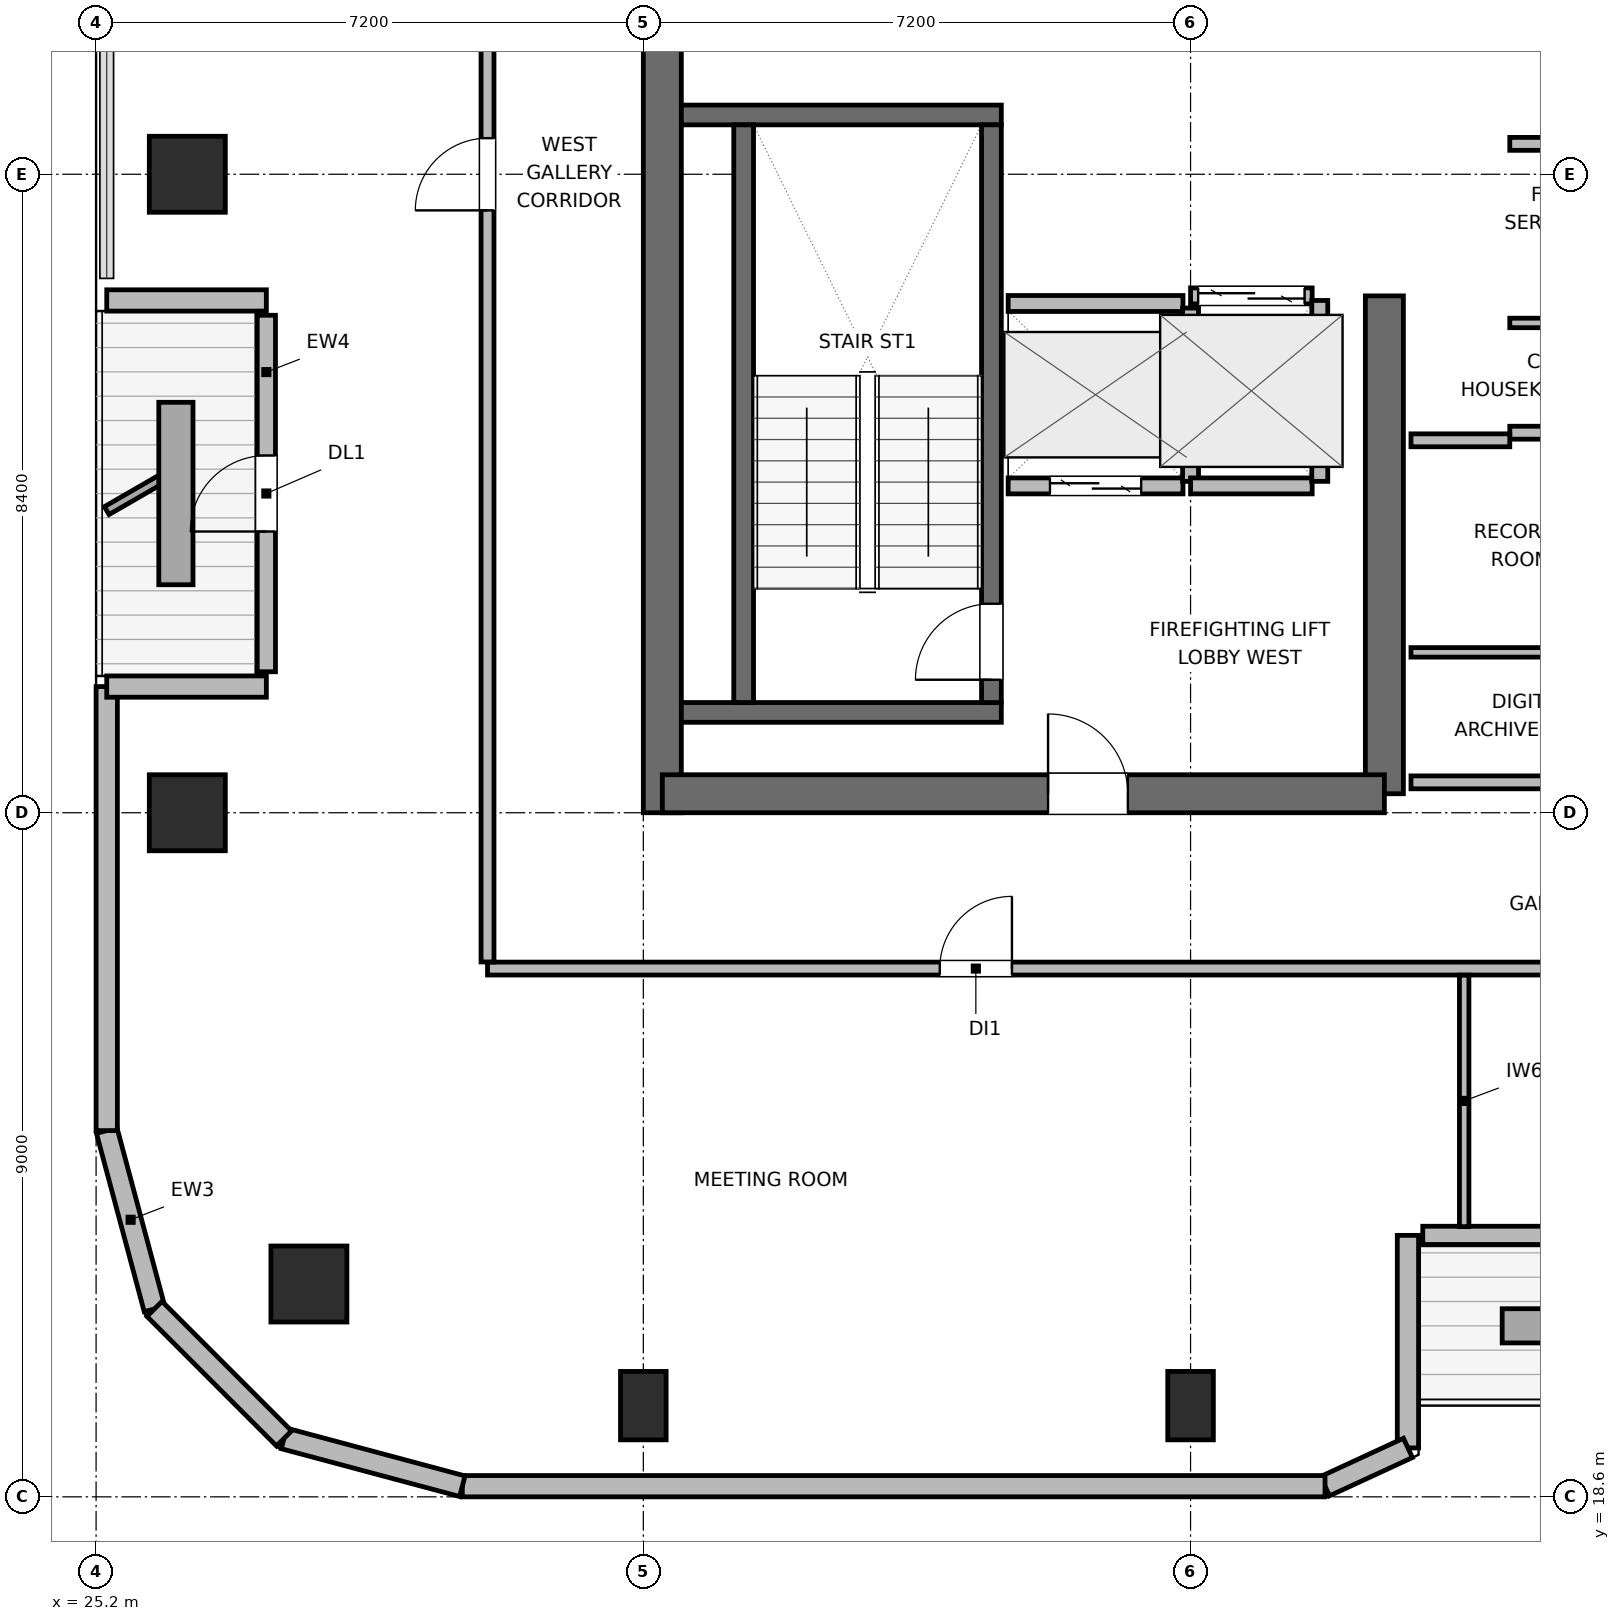
"""IFC4 building model, lengths in metres.
Left out: names, types, materials, properties, quantities, classifications, styles, units other than length and angle.
Written with IfcOpenShell. Run it as: python <this file> out.ifc"""

import sys

from ifc_helpers import new_model, si_unit, direction, frame, frame_2d, origin, origin_2d, place, context, subcontext, project, spatial, rectangle, circle, extrude, element, fill, save


model = new_model("IFC4")
c1 = context("Model", 3, precision=1e-05, world=origin(), true_north=direction((0.0, 1.0)))
c2 = subcontext(c1, "Body", "Model", "MODEL_VIEW")
j1 = project(units=[si_unit("LENGTHUNIT", "METRE"), si_unit("PLANEANGLEUNIT", "RADIAN")], contexts=[c1])
p1 = place(None, origin())
s1 = spatial("IfcSite", under=j1, at=p1, CompositionType="ELEMENT")
p2 = place(p1, origin())
s2 = spatial("IfcBuilding", under=s1, at=p2, CompositionType="ELEMENT")
p3 = place(p2, frame((0.0, 0.0, 274.5)))
s3 = spatial("IfcBuildingStorey", under=s2, at=p3, CompositionType="ELEMENT", Elevation=274.5)
p4 = place(p3, frame((32.65, 27.6, 0.0), z_axis=(0.0, 0.0, 1.0), x_axis=(0.0, 1.0, 0.0)))
e1 = element("IfcWall", 1, at=p4, inside=s3, PredefinedType="SHEAR", context=c2, shape_type="SweptSolid", body=[
    extrude(rectangle(XDim=16.8, YDim=0.5, at=frame_2d((8.4, 0.0))), origin(), (0.0, 0.0, 1.0), 3.9),
])
p5 = place(p3, frame((42.15, 27.85, 0.0), z_axis=(0.0, 0.0, 1.0), x_axis=(0.0, 1.0, 0.0)))
e2 = element("IfcWall", 2, at=p5, inside=s3, PredefinedType="SHEAR", context=c2, shape_type="SweptSolid", body=[
    extrude(rectangle(XDim=6.55, YDim=0.5, at=frame_2d((3.275, 0.0))), origin(), (0.0, 0.0, 1.0), 3.9),
])
p6 = place(p3, frame((32.65, 27.85, 0.0), z_axis=(0.0, 0.0, 1.0), x_axis=(1.0, 0.0, 0.0)))
e3 = element("IfcWall", 3, at=p6, inside=s3, PredefinedType="SHEAR", context=c2, shape_type="SweptSolid", body=[
    extrude(rectangle(XDim=9.5, YDim=0.5, at=frame_2d((4.75, 0.0))), origin(), (0.0, 0.0, 1.0), 3.9),
])
p7 = place(p6, frame((5.075, 0.0, 0.0)))
e4 = element("IfcOpeningElement", 4, at=p7, cuts=e3, PredefinedType="OPENING", context=c2, shape_type="SweptSolid", body=[
    extrude(rectangle(XDim=1.05, YDim=2.04, at=frame_2d((0.525, 1.02))), frame((0.0, 0.26, 0.0), z_axis=(0.0, -1.0, 0.0), x_axis=(1.0, 0.0, 0.0)), (0.0, 0.0, 1.0), 0.52),
])
for number, where, z_axis, x_axis in (
    (5, (32.9, 28.92, 0.0), (0.0, 0.0, 1.0), (1.0, 0.0, 0.0)),
    (6, (32.9, 36.78, 0.0), (0.0, 0.0, 1.0), (1.0, 0.0, 0.0)),
):
    element("IfcWall", number, at=place(p3, frame(where, z_axis=z_axis, x_axis=x_axis)), inside=s3, PredefinedType="SHEAR", context=c2, shape_type="SweptSolid", body=[
        extrude(rectangle(XDim=4.21, YDim=0.26, at=frame_2d((2.105, 0.0))), origin(), (0.0, 0.0, 1.0), 3.9),
    ])
p8 = place(p3, frame((33.72, 29.05, 0.0), z_axis=(0.0, 0.0, 1.0), x_axis=(0.0, 1.0, 0.0)))
e7 = element("IfcWall", 7, at=p8, inside=s3, PredefinedType="SHEAR", context=c2, shape_type="SweptSolid", body=[
    extrude(rectangle(XDim=7.6, YDim=0.26, at=frame_2d((3.8, 0.0))), origin(), (0.0, 0.0, 1.0), 3.9),
])
p9 = place(p3, frame((36.98, 29.05, 0.0), z_axis=(0.0, 0.0, 1.0), x_axis=(0.0, 1.0, 0.0)))
e8 = element("IfcWall", 8, at=p9, inside=s3, PredefinedType="SHEAR", context=c2, shape_type="SweptSolid", body=[
    extrude(rectangle(XDim=7.6, YDim=0.26, at=frame_2d((3.8, 0.0))), origin(), (0.0, 0.0, 1.0), 3.9),
])
p10 = place(p9, frame((0.3, 0.0, 0.0)))
e9 = element("IfcOpeningElement", 9, at=p10, cuts=e8, PredefinedType="OPENING", context=c2, shape_type="SweptSolid", body=[
    extrude(rectangle(XDim=1.0, YDim=2.04, at=frame_2d((0.5, 1.02))), frame((0.0, 0.14, 0.0), z_axis=(0.0, -1.0, 0.0), x_axis=(1.0, 0.0, 0.0)), (0.0, 0.0, 1.0), 0.28),
])
p11 = place(p3, frame((28.0, 21.4, 0.0), z_axis=(0.0, 0.0, 1.0), x_axis=(1.0, 0.0, 0.0)))
e10 = element("IfcColumn", 10, at=p11, inside=s3, PredefinedType="COLUMN", context=c2, shape_type="SweptSolid", body=[
    extrude(circle(Radius=0.5, at=origin_2d()), origin(), (0.0, 0.0, 1.0), 3.9),
])
for number, where, z_axis, x_axis in (
    (11, (32.4, 19.8, 0.0), (0.0, 0.0, 1.0), (1.0, 0.0, 0.0)),
    (12, (39.6, 19.8, 0.0), (0.0, 0.0, 1.0), (1.0, 0.0, 0.0)),
):
    element("IfcColumn", number, at=place(p3, frame(where, z_axis=z_axis, x_axis=x_axis)), inside=s3, PredefinedType="COLUMN", context=c2, shape_type="SweptSolid", body=[
        extrude(rectangle(XDim=0.6, YDim=0.9, at=origin_2d()), origin(), (0.0, 0.0, 1.0), 3.9),
    ])
for number, where, z_axis, x_axis in (
    (13, (26.4, 27.6, 0.0), (0.0, 0.0, 1.0), (1.0, 0.0, 0.0)),
    (14, (26.4, 36.0, 0.0), (0.0, 0.0, 1.0), (1.0, 0.0, 0.0)),
):
    element("IfcColumn", number, at=place(p3, frame(where, z_axis=z_axis, x_axis=x_axis)), inside=s3, PredefinedType="COLUMN", context=c2, shape_type="SweptSolid", body=[
        extrude(rectangle(XDim=1.0, YDim=1.0, at=origin_2d()), origin(), (0.0, 0.0, 1.0), 3.9),
    ])
p12 = place(p3, frame((25.969, 21.073, 0.0), z_axis=(0.0, 0.0, 1.0), x_axis=(-0.258751159445, 0.965944013639, 0.0)))
e15 = element("IfcWall", 15, at=p12, inside=s3, PredefinedType="SOLIDWALL", context=c2, shape_type="SweptSolid", body=[
    extrude(rectangle(XDim=2.429, YDim=0.28, at=frame_2d((1.214, 0.0))), origin(), (0.0, 0.0, 1.0), 3.68),
])
p13 = place(p3, frame((25.34, 23.418, 0.0), z_axis=(0.0, 0.0, 1.0), x_axis=(0.0, 1.0, 0.0)))
e16 = element("IfcWall", 16, at=p13, inside=s3, PredefinedType="SOLIDWALL", context=c2, shape_type="SweptSolid", body=[
    extrude(rectangle(XDim=5.842, YDim=0.28, at=frame_2d((2.921, 0.0))), origin(), (0.0, 0.0, 1.0), 3.68),
])
p14 = place(p3, frame((25.34, 29.26, 0.0), z_axis=(0.0, 0.0, 1.0), x_axis=(1.0, 0.0, 0.0)))
e17 = element("IfcWall", 17, at=p14, inside=s3, PredefinedType="SOLIDWALL", context=c2, shape_type="SweptSolid", body=[
    extrude(rectangle(XDim=2.1, YDim=0.28, at=frame_2d((1.05, 0.0))), origin(), (0.0, 0.0, 1.0), 3.126),
])
p15 = place(p3, frame((27.44, 29.455, 0.0), z_axis=(0.0, 0.0, 1.0), x_axis=(0.0, 1.0, 0.0)))
e18 = element("IfcWall", 18, at=p15, inside=s3, PredefinedType="SOLIDWALL", context=c2, shape_type="SweptSolid", body=[
    extrude(rectangle(XDim=4.69, YDim=0.24, at=frame_2d((2.345, 0.0))), origin(), (0.0, 0.0, 1.0), 3.311),
])
p16 = place(p15, frame((1.845, 0.0, 0.0)))
e19 = element("IfcOpeningElement", 19, at=p16, cuts=e18, PredefinedType="OPENING", context=c2, shape_type="SweptSolid", body=[
    extrude(rectangle(XDim=1.0, YDim=2.02, at=frame_2d((0.5, 1.01))), frame((0.0, 0.13, 0.0), z_axis=(0.0, -1.0, 0.0), x_axis=(1.0, 0.0, 0.0)), (0.0, 0.0, 1.0), 0.26),
])
p17 = place(p3, frame((27.44, 34.34, 0.0), z_axis=(0.0, 0.0, 1.0), x_axis=(-1.0, 0.0, 0.0)))
e20 = element("IfcWall", 20, at=p17, inside=s3, PredefinedType="SOLIDWALL", context=c2, shape_type="SweptSolid", body=[
    extrude(rectangle(XDim=2.1, YDim=0.28, at=frame_2d((1.05, 0.0))), origin(), (0.0, 0.0, 1.0), 3.126),
])
p18 = place(p3, frame((47.145, 22.04, 0.0), z_axis=(0.0, 0.0, 1.0), x_axis=(-1.0, 0.0, 0.0)))
e21 = element("IfcWall", 21, at=p18, inside=s3, PredefinedType="SOLIDWALL", context=c2, shape_type="SweptSolid", body=[
    extrude(rectangle(XDim=4.49, YDim=0.24, at=frame_2d((2.245, 0.0))), origin(), (0.0, 0.0, 1.0), 3.68),
])
p19 = place(p18, frame((1.745, 0.0, 0.0)))
e22 = element("IfcOpeningElement", 22, at=p19, cuts=e21, PredefinedType="OPENING", context=c2, shape_type="SweptSolid", body=[
    extrude(rectangle(XDim=1.0, YDim=2.02, at=frame_2d((0.5, 1.01))), frame((0.0, 0.13, 0.0), z_axis=(0.0, -1.0, 0.0), x_axis=(1.0, 0.0, 0.0)), (0.0, 0.0, 1.0), 0.26),
])
p20 = place(p3, frame((42.46, 22.04, 0.0), z_axis=(0.0, 0.0, 1.0), x_axis=(0.0, -1.0, 0.0)))
e23 = element("IfcWall", 23, at=p20, inside=s3, PredefinedType="SOLIDWALL", context=c2, shape_type="SweptSolid", body=[
    extrude(rectangle(XDim=2.796, YDim=0.28, at=frame_2d((1.398, 0.0))), origin(), (0.0, 0.0, 1.0), 2.265),
])
p21 = place(p3, frame((42.46, 19.244, 0.0), z_axis=(0.0, 0.0, 1.0), x_axis=(-0.907893953211, -0.419199916176, 0.0)))
e24 = element("IfcWall", 24, at=p21, inside=s3, PredefinedType="SOLIDWALL", context=c2, shape_type="SweptSolid", body=[
    extrude(rectangle(XDim=1.201, YDim=0.28, at=frame_2d((0.601, 0.0))), origin(), (0.0, 0.0, 1.0), 3.68),
])
p22 = place(p3, frame((41.369, 18.74, 0.0), z_axis=(0.0, 0.0, 1.0), x_axis=(-1.0, 0.0, 0.0)))
e25 = element("IfcWall", 25, at=p22, inside=s3, PredefinedType="SOLIDWALL", context=c2, shape_type="SweptSolid", body=[
    extrude(rectangle(XDim=11.351, YDim=0.28, at=frame_2d((5.675, 0.0))), origin(), (0.0, 0.0, 1.0), 3.68),
])
p23 = place(p3, frame((30.018, 18.74, 0.0), z_axis=(0.0, 0.0, 1.0), x_axis=(-0.965937282298, 0.25877628691, 0.0)))
e26 = element("IfcWall", 26, at=p23, inside=s3, PredefinedType="SOLIDWALL", context=c2, shape_type="SweptSolid", body=[
    extrude(rectangle(XDim=2.428, YDim=0.28, at=frame_2d((1.214, 0.0))), origin(), (0.0, 0.0, 1.0), 3.68),
])
p24 = place(p3, frame((27.673, 19.368, 0.0), z_axis=(0.0, 0.0, 1.0), x_axis=(-0.707106781187, 0.707106781187, 0.0)))
e27 = element("IfcWall", 27, at=p24, inside=s3, PredefinedType="SOLIDWALL", context=c2, shape_type="SweptSolid", body=[
    extrude(rectangle(XDim=2.41, YDim=0.28, at=frame_2d((1.205, 0.0))), origin(), (0.0, 0.0, 1.0), 3.68),
])
p25 = place(p3, frame((37.2, 31.9, 0.0), z_axis=(0.0, 0.0, 1.0), x_axis=(1.0, 0.0, 0.0)))
e28 = element("IfcWall", 28, at=p25, inside=s3, PredefinedType="PARTITIONING", context=c2, shape_type="SweptSolid", body=[
    extrude(rectangle(XDim=2.3, YDim=0.21, at=frame_2d((1.15, 0.0))), origin(), (0.0, 0.0, 1.0), 3.68),
])
p26 = place(p25, frame((0.55, 0.0, 0.0)))
e29 = element("IfcOpeningElement", 29, at=p26, cuts=e28, PredefinedType="OPENING", context=c2, shape_type="SweptSolid", body=[
    extrude(rectangle(XDim=1.2, YDim=2.04, at=frame_2d((0.6, 1.02))), frame((0.0, 0.115, 0.0), z_axis=(0.0, -1.0, 0.0), x_axis=(1.0, 0.0, 0.0)), (0.0, 0.0, 1.0), 0.23),
])
p27 = place(p3, frame((37.2, 34.3, 0.0), z_axis=(0.0, 0.0, 1.0), x_axis=(1.0, 0.0, 0.0)))
e30 = element("IfcWall", 30, at=p27, inside=s3, PredefinedType="PARTITIONING", context=c2, shape_type="SweptSolid", body=[
    extrude(rectangle(XDim=2.3, YDim=0.21, at=frame_2d((1.15, 0.0))), origin(), (0.0, 0.0, 1.0), 3.68),
])
p28 = place(p3, frame((39.6, 31.96, 0.0), z_axis=(0.0, 0.0, 1.0), x_axis=(0.0, 1.0, 0.0)))
e31 = element("IfcWall", 31, at=p28, inside=s3, PredefinedType="PARTITIONING", context=c2, shape_type="SweptSolid", body=[
    extrude(rectangle(XDim=2.28, YDim=0.21, at=frame_2d((1.14, 0.0))), origin(), (0.0, 0.0, 1.0), 3.68),
])
p29 = place(p3, frame((39.6, 34.4, 0.0), z_axis=(0.0, 0.0, 1.0), x_axis=(1.0, 0.0, 0.0)))
e32 = element("IfcWall", 32, at=p29, inside=s3, PredefinedType="PARTITIONING", context=c2, shape_type="SweptSolid", body=[
    extrude(rectangle(XDim=1.6, YDim=0.21, at=frame_2d((0.8, 0.0))), origin(), (0.0, 0.0, 1.0), 3.68),
])
p30 = place(p29, frame((0.1, 0.0, 0.0)))
e33 = element("IfcOpeningElement", 33, at=p30, cuts=e32, PredefinedType="OPENING", context=c2, shape_type="SweptSolid", body=[
    extrude(rectangle(XDim=1.4, YDim=2.06, at=frame_2d((0.7, 1.03))), frame((0.0, 0.115, 0.0), z_axis=(0.0, -1.0, 0.0), x_axis=(1.0, 0.0, 0.0)), (0.0, 0.0, 1.0), 0.23),
])
p31 = place(p3, frame((39.6, 31.9, 0.0), z_axis=(0.0, 0.0, 1.0), x_axis=(1.0, 0.0, 0.0)))
e34 = element("IfcWall", 34, at=p31, inside=s3, PredefinedType="PARTITIONING", context=c2, shape_type="SweptSolid", body=[
    extrude(rectangle(XDim=1.6, YDim=0.21, at=frame_2d((0.8, 0.0))), origin(), (0.0, 0.0, 1.0), 3.68),
])
p32 = place(p3, frame((41.3, 31.96, 0.0), z_axis=(0.0, 0.0, 1.0), x_axis=(0.0, 1.0, 0.0)))
e35 = element("IfcWall", 35, at=p32, inside=s3, PredefinedType="PARTITIONING", context=c2, shape_type="SweptSolid", body=[
    extrude(rectangle(XDim=2.38, YDim=0.21, at=frame_2d((1.19, 0.0))), origin(), (0.0, 0.0, 1.0), 3.68),
])
for number, where, z_axis, x_axis in (
    (36, (43.8, 32.6, 0.0), (0.0, 0.0, 1.0), (1.0, 0.0, 0.0)),
    (37, (43.8, 36.4, 0.0), (0.0, 0.0, 1.0), (1.0, 0.0, 0.0)),
):
    element("IfcWall", number, at=place(p3, frame(where, z_axis=z_axis, x_axis=x_axis)), inside=s3, PredefinedType="PARTITIONING", context=c2, shape_type="SweptSolid", body=[
        extrude(rectangle(XDim=2.913, YDim=0.17, at=frame_2d((1.457, 0.0))), origin(), (0.0, 0.0, 1.0), 3.68),
    ])
p33 = place(p3, frame((43.8, 34.044, 0.0), z_axis=(0.0, 0.0, 1.0), x_axis=(1.0, 0.0, 0.0)))
e38 = element("IfcWall", 38, at=p33, inside=s3, PredefinedType="PARTITIONING", context=c2, shape_type="SweptSolid", body=[
    extrude(rectangle(XDim=2.913, YDim=0.125, at=frame_2d((1.457, 0.0))), origin(), (0.0, 0.0, 1.0), 3.68),
])
p34 = place(p3, frame((42.5, 28.0, 0.0), z_axis=(0.0, 0.0, 1.0), x_axis=(1.0, 0.0, 0.0)))
e39 = element("IfcWall", 39, at=p34, inside=s3, PredefinedType="PARTITIONING", context=c2, shape_type="SweptSolid", body=[
    extrude(rectangle(XDim=4.213, YDim=0.17, at=frame_2d((2.106, 0.0))), origin(), (0.0, 0.0, 1.0), 2.765),
])
p35 = place(p3, frame((42.5, 32.5, 0.0), z_axis=(0.0, 0.0, 1.0), x_axis=(1.0, 0.0, 0.0)))
e40 = element("IfcWall", 40, at=p35, inside=s3, PredefinedType="PARTITIONING", context=c2, shape_type="SweptSolid", body=[
    extrude(rectangle(XDim=1.3, YDim=0.17, at=frame_2d((0.65, 0.0))), origin(), (0.0, 0.0, 1.0), 3.68),
])
p36 = place(p3, frame((42.5, 29.71, 0.0), z_axis=(0.0, 0.0, 1.0), x_axis=(1.0, 0.0, 0.0)))
e41 = element("IfcWall", 41, at=p36, inside=s3, PredefinedType="PARTITIONING", context=c2, shape_type="SweptSolid", body=[
    extrude(rectangle(XDim=4.213, YDim=0.125, at=frame_2d((2.106, 0.0))), origin(), (0.0, 0.0, 1.0), 3.68),
])
p37 = place(p3, frame((30.35, 25.55, 0.0), z_axis=(0.0, 0.0, 1.0), x_axis=(1.0, 0.0, 0.0)))
e42 = element("IfcWall", 42, at=p37, inside=s3, PredefinedType="PARTITIONING", context=c2, shape_type="SweptSolid", body=[
    extrude(rectangle(XDim=33.25, YDim=0.17, at=frame_2d((16.625, 0.0))), origin(), (0.0, 0.0, 1.0), 3.68),
])
p38 = place(p37, frame((5.95, 0.0, 0.0)))
e43 = element("IfcOpeningElement", 43, at=p38, cuts=e42, PredefinedType="OPENING", context=c2, shape_type="SweptSolid", body=[
    extrude(rectangle(XDim=0.95, YDim=2.04, at=frame_2d((0.475, 1.02))), frame((0.0, 0.095, 0.0), z_axis=(0.0, -1.0, 0.0), x_axis=(1.0, 0.0, 0.0)), (0.0, 0.0, 1.0), 0.19),
])
p39 = place(p37, frame((22.575, 0.0, 0.0)))
e44 = element("IfcOpeningElement", 44, at=p39, cuts=e42, PredefinedType="OPENING", context=c2, shape_type="SweptSolid", body=[
    extrude(rectangle(XDim=0.95, YDim=2.04, at=frame_2d((0.475, 1.02))), frame((0.0, 0.095, 0.0), z_axis=(0.0, -1.0, 0.0), x_axis=(1.0, 0.0, 0.0)), (0.0, 0.0, 1.0), 0.19),
])
p40 = place(p3, frame((30.35, 25.637, 0.0), z_axis=(0.0, 0.0, 1.0), x_axis=(0.0, 1.0, 0.0)))
e45 = element("IfcWall", 45, at=p40, inside=s3, PredefinedType="PARTITIONING", context=c2, shape_type="SweptSolid", body=[
    extrude(rectangle(XDim=20.726, YDim=0.17, at=frame_2d((10.363, 0.0))), origin(), (0.0, 0.0, 1.0), 3.68),
])
p41 = place(p40, frame((9.888, 0.0, 0.0)))
e46 = element("IfcOpeningElement", 46, at=p41, cuts=e45, PredefinedType="OPENING", context=c2, shape_type="SweptSolid", body=[
    extrude(rectangle(XDim=0.95, YDim=2.04, at=frame_2d((0.475, 1.02))), frame((0.0, 0.095, 0.0), z_axis=(0.0, -1.0, 0.0), x_axis=(1.0, 0.0, 0.0)), (0.0, 0.0, 1.0), 0.19),
])
p42 = place(p3, frame((43.2, 22.155, 0.0), z_axis=(0.0, 0.0, 1.0), x_axis=(0.0, 1.0, 0.0)))
e47 = element("IfcWall", 47, at=p42, inside=s3, PredefinedType="PARTITIONING", context=c2, shape_type="SweptSolid", body=[
    extrude(rectangle(XDim=3.308, YDim=0.125, at=frame_2d((1.654, 0.0))), origin(), (0.0, 0.0, 1.0), 3.043),
])
p43 = place(p16, origin())
e48 = element("IfcDoor", 48, at=p43, inside=s3, OperationType="SINGLE_SWING_LEFT", PredefinedType="DOOR", context=c2, shape_type="SweptSolid", body=[
    extrude(rectangle(XDim=1.0, YDim=2.02, at=frame_2d((0.5, 1.01))), frame((0.0, 0.025, 0.0), z_axis=(0.0, -1.0, 0.0), x_axis=(1.0, 0.0, 0.0)), (0.0, 0.0, 1.0), 0.05),
])
fill(e19, e48)
p44 = place(p10, origin())
e49 = element("IfcDoor", 49, at=p44, inside=s3, OperationType="SINGLE_SWING_LEFT", PredefinedType="DOOR", context=c2, shape_type="SweptSolid", body=[
    extrude(rectangle(XDim=1.0, YDim=2.04, at=frame_2d((0.5, 1.02))), frame((0.0, 0.025, 0.0), z_axis=(0.0, -1.0, 0.0), x_axis=(1.0, 0.0, 0.0)), (0.0, 0.0, 1.0), 0.05),
])
fill(e9, e49)
p45 = place(p26, origin())
e50 = element("IfcDoor", 50, at=p45, inside=s3, OperationType="DOUBLE_DOOR_SLIDING", PredefinedType="DOOR", context=c2, shape_type="SweptSolid", body=[
    extrude(rectangle(XDim=1.2, YDim=2.04, at=frame_2d((0.6, 1.02))), frame((0.0, 0.025, 0.0), z_axis=(0.0, -1.0, 0.0), x_axis=(1.0, 0.0, 0.0)), (0.0, 0.0, 1.0), 0.05),
])
fill(e29, e50)
p46 = place(p30, origin())
e51 = element("IfcDoor", 51, at=p46, inside=s3, OperationType="DOUBLE_DOOR_SLIDING", PredefinedType="DOOR", context=c2, shape_type="SweptSolid", body=[
    extrude(rectangle(XDim=1.4, YDim=2.06, at=frame_2d((0.7, 1.03))), frame((0.0, 0.025, 0.0), z_axis=(0.0, -1.0, 0.0), x_axis=(1.0, 0.0, 0.0)), (0.0, 0.0, 1.0), 0.05),
])
fill(e33, e51)
p47 = place(p7, origin())
e52 = element("IfcDoor", 52, at=p47, inside=s3, OperationType="SINGLE_SWING_LEFT", PredefinedType="DOOR", context=c2, shape_type="SweptSolid", body=[
    extrude(rectangle(XDim=1.05, YDim=2.04, at=frame_2d((0.525, 1.02))), frame((0.0, 0.025, 0.0), z_axis=(0.0, -1.0, 0.0), x_axis=(1.0, 0.0, 0.0)), (0.0, 0.0, 1.0), 0.05),
])
fill(e4, e52)
p48 = place(p38, origin())
e53 = element("IfcDoor", 53, at=p48, inside=s3, OperationType="SINGLE_SWING_RIGHT", PredefinedType="DOOR", context=c2, shape_type="SweptSolid", body=[
    extrude(rectangle(XDim=0.95, YDim=2.04, at=frame_2d((0.475, 1.02))), frame((0.0, 0.025, 0.0), z_axis=(0.0, -1.0, 0.0), x_axis=(1.0, 0.0, 0.0)), (0.0, 0.0, 1.0), 0.05),
])
fill(e43, e53)
p49 = place(p41, origin())
e54 = element("IfcDoor", 54, at=p49, inside=s3, OperationType="SINGLE_SWING_LEFT", PredefinedType="DOOR", context=c2, shape_type="SweptSolid", body=[
    extrude(rectangle(XDim=0.95, YDim=2.04, at=frame_2d((0.475, 1.02))), frame((0.0, 0.025, 0.0), z_axis=(0.0, -1.0, 0.0), x_axis=(1.0, 0.0, 0.0)), (0.0, 0.0, 1.0), 0.05),
])
fill(e46, e54)
save(model, sys.argv[1])
